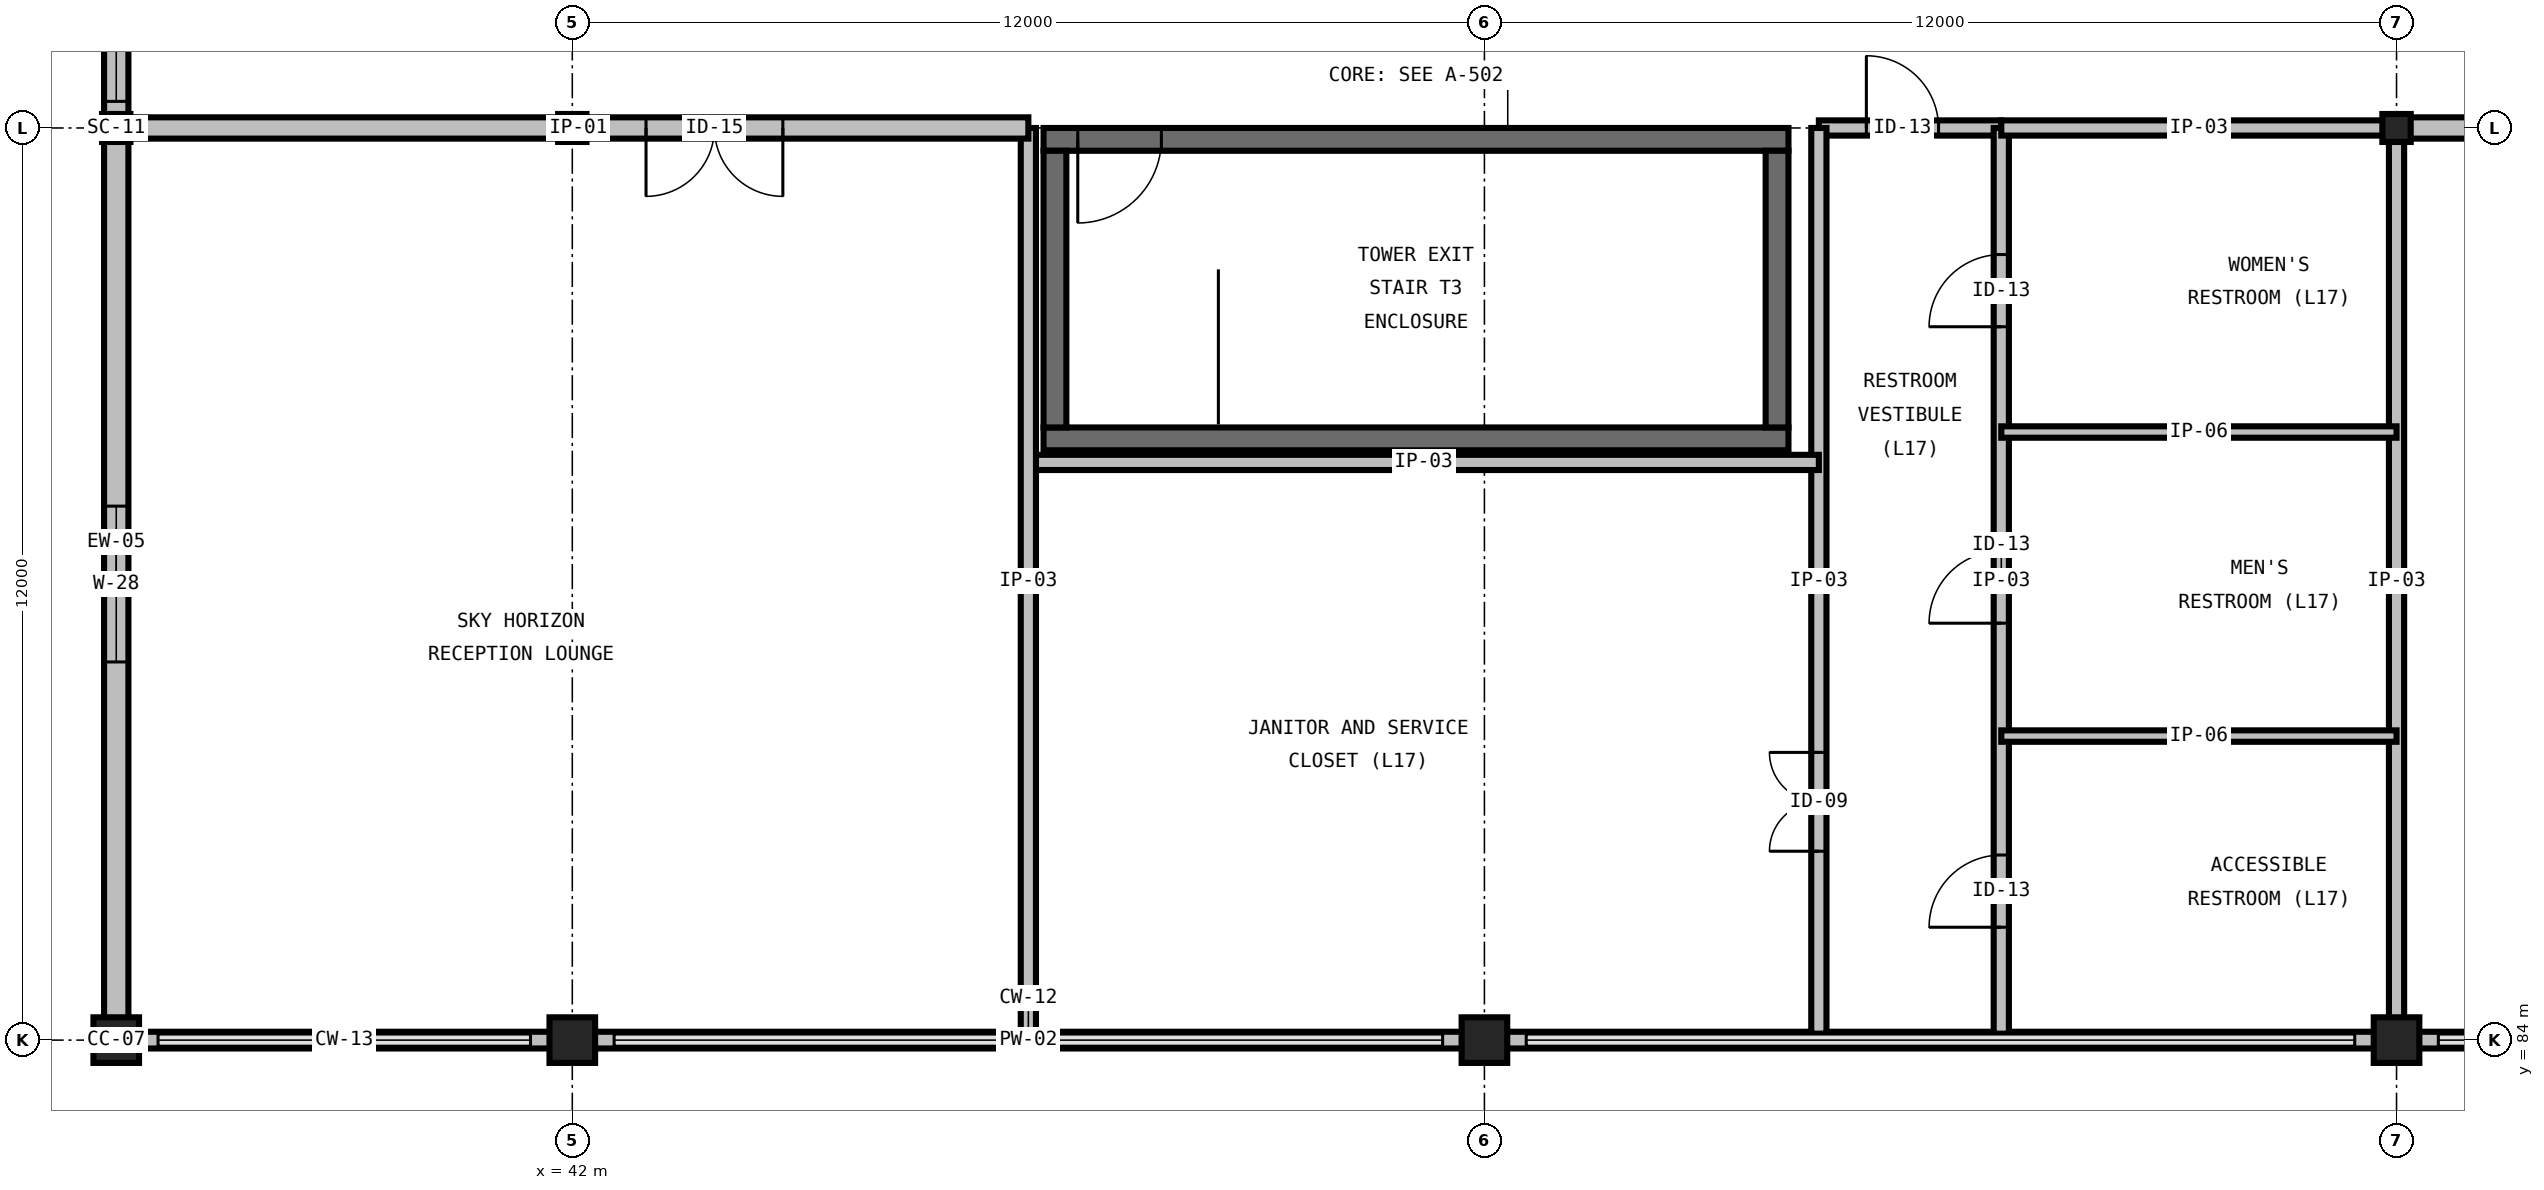
"""IFC4 building model, lengths in metres.
Left out: names, types, materials, properties, quantities, classifications, styles, units other than length and angle.
Written with IfcOpenShell. Run it as: python <this file> out.ifc"""

import sys

from ifc_helpers import new_model, si_unit, direction, frame, frame_2d, origin, origin_2d, place, context, subcontext, project, spatial, rectangle, i_section, extrude, element, fill, save


model = new_model("IFC4")
c1 = context("Model", 3, precision=1e-05, world=origin(), true_north=direction((0.0, 1.0)))
c2 = subcontext(c1, "Body", "Model", "MODEL_VIEW")
j1 = project(units=[si_unit("LENGTHUNIT", "METRE"), si_unit("PLANEANGLEUNIT", "RADIAN")], contexts=[c1])
p1 = place(None, origin())
s1 = spatial("IfcSite", under=j1, at=p1, CompositionType="ELEMENT")
p2 = place(p1, origin())
s2 = spatial("IfcBuilding", under=s1, at=p2, CompositionType="ELEMENT")
p3 = place(p2, frame((0.0, 0.0, 70.8)))
s3 = spatial("IfcBuildingStorey", under=s2, at=p3, CompositionType="ELEMENT", Elevation=70.8)
p4 = place(p3, frame((36.0, 84.0, 0.0), z_axis=(0.0, 0.0, 1.0), x_axis=(1.0, 0.0, 0.0)))
e1 = element("IfcColumn", 1, at=p4, inside=s3, PredefinedType="COLUMN", context=c2, shape_type="SweptSolid", body=[
    extrude(rectangle(XDim=0.6, YDim=0.6, at=origin_2d()), origin(), (0.0, 0.0, 1.0), 4.8),
])
p5 = place(p3, frame((36.0, 96.0, 0.0), z_axis=(0.0, 0.0, 1.0), x_axis=(1.0, 0.0, 0.0)))
e2 = element("IfcColumn", 2, at=p5, inside=s3, PredefinedType="COLUMN", context=c2, shape_type="SweptSolid", body=[
    extrude(i_section(OverallWidth=0.373, OverallDepth=0.368, WebThickness=0.015, FlangeThickness=0.024, FilletRadius=0.031, at=origin_2d()), origin(), (0.0, 0.0, 1.0), 4.8),
])
p6 = place(p3, frame((42.0, 84.0, 0.0), z_axis=(0.0, 0.0, 1.0), x_axis=(1.0, 0.0, 0.0)))
e3 = element("IfcColumn", 3, at=p6, inside=s3, PredefinedType="COLUMN", context=c2, shape_type="SweptSolid", body=[
    extrude(rectangle(XDim=0.6, YDim=0.6, at=origin_2d()), origin(), (0.0, 0.0, 1.0), 4.8),
])
p7 = place(p3, frame((42.0, 96.0, 0.0), z_axis=(0.0, 0.0, 1.0), x_axis=(1.0, 0.0, 0.0)))
e4 = element("IfcColumn", 4, at=p7, inside=s3, PredefinedType="COLUMN", context=c2, shape_type="SweptSolid", body=[
    extrude(i_section(OverallWidth=0.373, OverallDepth=0.368, WebThickness=0.015, FlangeThickness=0.024, FilletRadius=0.031, at=origin_2d()), origin(), (0.0, 0.0, 1.0), 4.8),
])
for number, where, z_axis, x_axis in (
    (5, (54.0, 84.0, 0.0), (0.0, 0.0, 1.0), (1.0, 0.0, 0.0)),
    (6, (66.0, 84.0, 0.0), (0.0, 0.0, 1.0), (1.0, 0.0, 0.0)),
):
    element("IfcColumn", number, at=place(p3, frame(where, z_axis=z_axis, x_axis=x_axis)), inside=s3, PredefinedType="COLUMN", context=c2, shape_type="SweptSolid", body=[
        extrude(rectangle(XDim=0.6, YDim=0.6, at=origin_2d()), origin(), (0.0, 0.0, 1.0), 4.8),
    ])
p8 = place(p3, frame((66.0, 96.0, 0.0), z_axis=(0.0, 0.0, 1.0), x_axis=(1.0, 0.0, 0.0)))
e7 = element("IfcColumn", 7, at=p8, inside=s3, PredefinedType="COLUMN", context=c2, shape_type="SweptSolid", body=[
    extrude(i_section(OverallWidth=0.373, OverallDepth=0.368, WebThickness=0.015, FlangeThickness=0.024, FilletRadius=0.031, at=origin_2d()), origin(), (0.0, 0.0, 1.0), 4.8),
])
p9 = place(p3, frame((48.2, 91.91, 0.0), z_axis=(0.0, 0.0, 1.0), x_axis=(1.0, 0.0, 0.0)))
e8 = element("IfcWall", 8, at=p9, inside=s3, PredefinedType="SHEAR", context=c2, shape_type="SweptSolid", body=[
    extrude(rectangle(XDim=9.8, YDim=0.3, at=frame_2d((4.9, 0.0))), origin(), (0.0, 0.0, 1.0), 4.8),
])
p10 = place(p3, frame((58.0, 95.85, 0.0), z_axis=(0.0, 0.0, 1.0), x_axis=(-1.0, 0.0, 0.0)))
e9 = element("IfcWall", 9, at=p10, inside=s3, PredefinedType="SHEAR", context=c2, shape_type="SweptSolid", body=[
    extrude(rectangle(XDim=9.8, YDim=0.3, at=frame_2d((4.9, 0.0))), origin(), (0.0, 0.0, 1.0), 4.8),
])
p11 = place(p10, frame((8.25, 0.0, 0.0)))
e10 = element("IfcOpeningElement", 10, at=p11, cuts=e9, PredefinedType="OPENING", context=c2, shape_type="SweptSolid", body=[
    extrude(rectangle(XDim=1.1, YDim=2.2, at=frame_2d((0.55, 1.1))), frame((0.0, 0.165, 0.0), z_axis=(0.0, -1.0, 0.0), x_axis=(1.0, 0.0, 0.0)), (0.0, 0.0, 1.0), 0.33),
])
for number, where, z_axis, x_axis in (
    (11, (48.35, 95.7, 0.0), (0.0, 0.0, 1.0), (0.0, -1.0, 0.0)),
    (12, (57.85, 92.06, 0.0), (0.0, 0.0, 1.0), (0.0, 1.0, 0.0)),
):
    element("IfcWall", number, at=place(p3, frame(where, z_axis=z_axis, x_axis=x_axis)), inside=s3, PredefinedType="SHEAR", context=c2, shape_type="SweptSolid", body=[
        extrude(rectangle(XDim=3.64, YDim=0.3, at=frame_2d((1.82, 0.0))), origin(), (0.0, 0.0, 1.0), 4.8),
    ])
p12 = place(p3, frame((36.0, 84.0, 0.0), z_axis=(0.0, 0.0, 1.0), x_axis=(1.0, 0.0, 0.0)))
e13 = element("IfcWall", 13, at=p12, inside=s3, PredefinedType="PARAPET", context=c2, shape_type="SweptSolid", body=[
    extrude(rectangle(XDim=6.0, YDim=0.22, at=frame_2d((3.0, 0.0))), origin(), (0.0, 0.0, 1.0), 0.2),
])
for number, where, z_axis, x_axis in (
    (14, (42.0, 84.0, 0.0), (0.0, 0.0, 1.0), (1.0, 0.0, 0.0)),
    (15, (54.0, 84.0, 0.0), (0.0, 0.0, 1.0), (1.0, 0.0, 0.0)),
    (16, (66.0, 84.0, 0.0), (0.0, 0.0, 1.0), (1.0, 0.0, 0.0)),
):
    element("IfcWall", number, at=place(p3, frame(where, z_axis=z_axis, x_axis=x_axis)), inside=s3, PredefinedType="PARAPET", context=c2, shape_type="SweptSolid", body=[
        extrude(rectangle(XDim=12.0, YDim=0.22, at=frame_2d((6.0, 0.0))), origin(), (0.0, 0.0, 1.0), 0.2),
    ])
p13 = place(p3, frame((36.0, 96.0, 0.0), z_axis=(0.0, 0.0, 1.0), x_axis=(0.0, -1.0, 0.0)))
e17 = element("IfcWall", 17, at=p13, inside=s3, PredefinedType="STANDARD", context=c2, shape_type="SweptSolid", body=[
    extrude(rectangle(XDim=12.0, YDim=0.32, at=frame_2d((6.0, 0.0))), origin(), (0.0, 0.0, 1.0), 4.171),
])
p14 = place(p13, frame((4.975, 0.0, 0.85)))
e18 = element("IfcOpeningElement", 18, at=p14, cuts=e17, PredefinedType="OPENING", context=c2, shape_type="SweptSolid", body=[
    extrude(rectangle(XDim=2.05, YDim=2.1, at=frame_2d((1.025, 1.05))), frame((0.0, 0.175, 0.0), z_axis=(0.0, -1.0, 0.0), x_axis=(1.0, 0.0, 0.0)), (0.0, 0.0, 1.0), 0.35),
])
p15 = place(p3, frame((36.0, 105.0, 0.0), z_axis=(0.0, 0.0, 1.0), x_axis=(0.0, -1.0, 0.0)))
e19 = element("IfcWall", 19, at=p15, inside=s3, PredefinedType="STANDARD", context=c2, shape_type="SweptSolid", body=[
    extrude(rectangle(XDim=9.0, YDim=0.32, at=frame_2d((4.5, 0.0))), origin(), (0.0, 0.0, 1.0), 4.171),
])
p16 = place(p15, frame((6.6, 0.0, 0.85)))
e20 = element("IfcOpeningElement", 20, at=p16, cuts=e19, PredefinedType="OPENING", context=c2, shape_type="SweptSolid", body=[
    extrude(rectangle(XDim=2.05, YDim=2.1, at=frame_2d((1.025, 1.05))), frame((0.0, 0.175, 0.0), z_axis=(0.0, -1.0, 0.0), x_axis=(1.0, 0.0, 0.0)), (0.0, 0.0, 1.0), 0.35),
])
p17 = place(p3, frame((36.0, 84.14, 4.8), z_axis=(0.0, 0.0, 1.0), x_axis=(1.0, 0.0, 0.0)))
e21 = element("IfcWall", 21, at=p17, inside=s3, PredefinedType="PARAPET", context=c2, shape_type="SweptSolid", body=[
    extrude(rectangle(XDim=42.0, YDim=0.28, at=frame_2d((21.0, 0.0))), origin(), (0.0, 0.0, 1.0), 1.2),
])
p18 = place(p3, frame((36.14, 116.72, 4.8), z_axis=(0.0, 0.0, 1.0), x_axis=(0.0, -1.0, 0.0)))
e22 = element("IfcWall", 22, at=p18, inside=s3, PredefinedType="PARAPET", context=c2, shape_type="SweptSolid", body=[
    extrude(rectangle(XDim=32.44, YDim=0.28, at=frame_2d((16.22, 0.0))), origin(), (0.0, 0.0, 1.0), 1.2),
])
p19 = place(p3, frame((58.4, 96.0, 0.0), z_axis=(0.0, 0.0, 1.0), x_axis=(1.0, 0.0, 0.0)))
e23 = element("IfcWall", 23, at=p19, inside=s3, PredefinedType="PARTITIONING", context=c2, shape_type="SweptSolid", body=[
    extrude(rectangle(XDim=2.4, YDim=0.2, at=frame_2d((1.2, 0.0))), origin(), (0.0, 0.0, 1.0), 3.549),
])
p20 = place(p19, frame((0.625, 0.0, 0.0)))
e24 = element("IfcOpeningElement", 24, at=p20, cuts=e23, PredefinedType="OPENING", context=c2, shape_type="SweptSolid", body=[
    extrude(rectangle(XDim=0.95, YDim=2.15, at=frame_2d((0.475, 1.075))), frame((0.0, 0.115, 0.0), z_axis=(0.0, -1.0, 0.0), x_axis=(1.0, 0.0, 0.0)), (0.0, 0.0, 1.0), 0.23),
])
p21 = place(p3, frame((58.4, 84.085, 0.0), z_axis=(0.0, 0.0, 1.0), x_axis=(0.0, 1.0, 0.0)))
e25 = element("IfcWall", 25, at=p21, inside=s3, PredefinedType="PARTITIONING", context=c2, shape_type="SweptSolid", body=[
    extrude(rectangle(XDim=11.915, YDim=0.2, at=frame_2d((5.957, 0.0))), origin(), (0.0, 0.0, 1.0), 4.48),
])
p22 = place(p21, frame((2.4, 0.0, 0.0)))
e26 = element("IfcOpeningElement", 26, at=p22, cuts=e25, PredefinedType="OPENING", context=c2, shape_type="SweptSolid", body=[
    extrude(rectangle(XDim=1.3, YDim=2.2, at=frame_2d((0.65, 1.1))), frame((0.0, 0.115, 0.0), z_axis=(0.0, -1.0, 0.0), x_axis=(1.0, 0.0, 0.0)), (0.0, 0.0, 1.0), 0.23),
])
p23 = place(p3, frame((60.8, 84.085, 0.0), z_axis=(0.0, 0.0, 1.0), x_axis=(0.0, 1.0, 0.0)))
e27 = element("IfcWall", 27, at=p23, inside=s3, PredefinedType="PARTITIONING", context=c2, shape_type="SweptSolid", body=[
    extrude(rectangle(XDim=11.915, YDim=0.2, at=frame_2d((5.957, 0.0))), origin(), (0.0, 0.0, 1.0), 4.48),
])
p24 = place(p23, frame((1.4, 0.0, 0.0)))
e28 = element("IfcOpeningElement", 28, at=p24, cuts=e27, PredefinedType="OPENING", context=c2, shape_type="SweptSolid", body=[
    extrude(rectangle(XDim=0.95, YDim=2.15, at=frame_2d((0.475, 1.075))), frame((0.0, 0.115, 0.0), z_axis=(0.0, -1.0, 0.0), x_axis=(1.0, 0.0, 0.0)), (0.0, 0.0, 1.0), 0.23),
])
p25 = place(p23, frame((5.4, 0.0, 0.0)))
e29 = element("IfcOpeningElement", 29, at=p25, cuts=e27, PredefinedType="OPENING", context=c2, shape_type="SweptSolid", body=[
    extrude(rectangle(XDim=0.95, YDim=2.15, at=frame_2d((0.475, 1.075))), frame((0.0, 0.115, 0.0), z_axis=(0.0, -1.0, 0.0), x_axis=(1.0, 0.0, 0.0)), (0.0, 0.0, 1.0), 0.23),
])
p26 = place(p23, frame((9.3, 0.0, 0.0)))
e30 = element("IfcOpeningElement", 30, at=p26, cuts=e27, PredefinedType="OPENING", context=c2, shape_type="SweptSolid", body=[
    extrude(rectangle(XDim=0.95, YDim=2.15, at=frame_2d((0.475, 1.075))), frame((0.0, 0.115, 0.0), z_axis=(0.0, -1.0, 0.0), x_axis=(1.0, 0.0, 0.0)), (0.0, 0.0, 1.0), 0.23),
])
p27 = place(p3, frame((66.0, 84.085, 0.0), z_axis=(0.0, 0.0, 1.0), x_axis=(0.0, 1.0, 0.0)))
e31 = element("IfcWall", 31, at=p27, inside=s3, PredefinedType="PARTITIONING", context=c2, shape_type="SweptSolid", body=[
    extrude(rectangle(XDim=11.915, YDim=0.2, at=frame_2d((5.957, 0.0))), origin(), (0.0, 0.0, 1.0), 3.78),
])
p28 = place(p3, frame((60.8, 96.0, 0.0), z_axis=(0.0, 0.0, 1.0), x_axis=(1.0, 0.0, 0.0)))
e32 = element("IfcWall", 32, at=p28, inside=s3, PredefinedType="PARTITIONING", context=c2, shape_type="SweptSolid", body=[
    extrude(rectangle(XDim=5.2, YDim=0.2, at=frame_2d((2.6, 0.0))), origin(), (0.0, 0.0, 1.0), 3.549),
])
for number, where, z_axis, x_axis in (
    (33, (60.8, 88.0, 0.0), (0.0, 0.0, 1.0), (1.0, 0.0, 0.0)),
    (34, (60.8, 92.0, 0.0), (0.0, 0.0, 1.0), (1.0, 0.0, 0.0)),
):
    element("IfcWall", number, at=place(p3, frame(where, z_axis=z_axis, x_axis=x_axis)), inside=s3, PredefinedType="PARTITIONING", context=c2, shape_type="SweptSolid", body=[
        extrude(rectangle(XDim=5.2, YDim=0.15, at=frame_2d((2.6, 0.0))), origin(), (0.0, 0.0, 1.0), 4.48),
    ])
p29 = place(p3, frame((48.0, 91.6, 0.0), z_axis=(0.0, 0.0, 1.0), x_axis=(1.0, 0.0, 0.0)))
e35 = element("IfcWall", 35, at=p29, inside=s3, PredefinedType="PARTITIONING", context=c2, shape_type="SweptSolid", body=[
    extrude(rectangle(XDim=10.4, YDim=0.2, at=frame_2d((5.2, 0.0))), origin(), (0.0, 0.0, 1.0), 4.48),
])
p30 = place(p3, frame((48.0, 84.085, 0.0), z_axis=(0.0, 0.0, 1.0), x_axis=(0.0, 1.0, 0.0)))
e36 = element("IfcWall", 36, at=p30, inside=s3, PredefinedType="PARTITIONING", context=c2, shape_type="SweptSolid", body=[
    extrude(rectangle(XDim=11.915, YDim=0.2, at=frame_2d((5.957, 0.0))), origin(), (0.0, 0.0, 1.0), 4.48),
])
p31 = place(p3, frame((48.0, 96.0, 0.0), z_axis=(0.0, 0.0, 1.0), x_axis=(-1.0, 0.0, 0.0)))
e37 = element("IfcWall", 37, at=p31, inside=s3, PredefinedType="PARTITIONING", context=c2, shape_type="SweptSolid", body=[
    extrude(rectangle(XDim=11.84, YDim=0.28, at=frame_2d((5.92, 0.0))), origin(), (0.0, 0.0, 1.0), 3.549),
])
p32 = place(p31, frame((3.23, 0.0, 0.0)))
e38 = element("IfcOpeningElement", 38, at=p32, cuts=e37, PredefinedType="OPENING", context=c2, shape_type="SweptSolid", body=[
    extrude(rectangle(XDim=1.8, YDim=2.3, at=frame_2d((0.9, 1.15))), frame((0.0, 0.155, 0.0), z_axis=(0.0, -1.0, 0.0), x_axis=(1.0, 0.0, 0.0)), (0.0, 0.0, 1.0), 0.31),
])
p33 = place(p3, frame((77.84, 96.0, 0.0), z_axis=(0.0, 0.0, 1.0), x_axis=(-1.0, 0.0, 0.0)))
e39 = element("IfcWall", 39, at=p33, inside=s3, PredefinedType="PARTITIONING", context=c2, shape_type="SweptSolid", body=[
    extrude(rectangle(XDim=11.84, YDim=0.28, at=frame_2d((5.92, 0.0))), origin(), (0.0, 0.0, 1.0), 3.854),
])
p34 = place(p33, frame((4.5, 0.0, 0.0)))
e40 = element("IfcOpeningElement", 40, at=p34, cuts=e39, PredefinedType="OPENING", context=c2, shape_type="SweptSolid", body=[
    extrude(rectangle(XDim=1.8, YDim=2.3, at=frame_2d((0.9, 1.15))), frame((0.0, 0.155, 0.0), z_axis=(0.0, -1.0, 0.0), x_axis=(1.0, 0.0, 0.0)), (0.0, 0.0, 1.0), 0.31),
])
p35 = place(p11, origin())
e41 = element("IfcDoor", 41, at=p35, inside=s3, OperationType="SINGLE_SWING_RIGHT", PredefinedType="DOOR", context=c2, shape_type="SweptSolid", body=[
    extrude(rectangle(XDim=1.1, YDim=2.2, at=frame_2d((0.55, 1.1))), frame((0.0, 0.025, 0.0), z_axis=(0.0, -1.0, 0.0), x_axis=(1.0, 0.0, 0.0)), (0.0, 0.0, 1.0), 0.05),
])
fill(e10, e41)
p36 = place(p3, frame((0.0, 0.0, 4.48)))
p37 = place(p36, frame((49.5, 93.88, 0.0)))
p38 = place(p37, frame((0.0, 0.0, 0.27)))
e42 = element("IfcDoor", 42, at=p38, inside=s3, OperationType="SWING_FIXED_LEFT", PredefinedType="TRAPDOOR", context=c2, shape_type="SweptSolid", body=[
    extrude(rectangle(XDim=1.0, YDim=1.2, at=origin_2d()), origin(), (0.0, 0.0, 1.0), 0.05),
])
p39 = place(p14, origin())
e43 = element("IfcWindow", 43, at=p39, inside=s3, PartitioningType="DOUBLE_PANEL_VERTICAL", PredefinedType="WINDOW", context=c2, shape_type="SweptSolid", body=[
    extrude(rectangle(XDim=2.05, YDim=2.1, at=frame_2d((1.025, 1.05))), frame((0.0, 0.03, 0.0), z_axis=(0.0, -1.0, 0.0), x_axis=(1.0, 0.0, 0.0)), (0.0, 0.0, 1.0), 0.06),
])
fill(e18, e43)
p40 = place(p16, origin())
e44 = element("IfcWindow", 44, at=p40, inside=s3, PartitioningType="DOUBLE_PANEL_VERTICAL", PredefinedType="WINDOW", context=c2, shape_type="SweptSolid", body=[
    extrude(rectangle(XDim=2.05, YDim=2.1, at=frame_2d((1.025, 1.05))), frame((0.0, 0.03, 0.0), z_axis=(0.0, -1.0, 0.0), x_axis=(1.0, 0.0, 0.0)), (0.0, 0.0, 1.0), 0.06),
])
fill(e20, e44)
p41 = place(p20, origin())
e45 = element("IfcDoor", 45, at=p41, inside=s3, OperationType="SINGLE_SWING_LEFT", PredefinedType="DOOR", context=c2, shape_type="SweptSolid", body=[
    extrude(rectangle(XDim=0.95, YDim=2.15, at=frame_2d((0.475, 1.075))), frame((0.0, 0.025, 0.0), z_axis=(0.0, -1.0, 0.0), x_axis=(1.0, 0.0, 0.0)), (0.0, 0.0, 1.0), 0.05),
])
fill(e24, e45)
p42 = place(p22, origin())
e46 = element("IfcDoor", 46, at=p42, inside=s3, OperationType="DOUBLE_DOOR_SINGLE_SWING", PredefinedType="DOOR", context=c2, shape_type="SweptSolid", body=[
    extrude(rectangle(XDim=1.3, YDim=2.2, at=frame_2d((0.65, 1.1))), frame((0.0, 0.025, 0.0), z_axis=(0.0, -1.0, 0.0), x_axis=(1.0, 0.0, 0.0)), (0.0, 0.0, 1.0), 0.05),
])
fill(e26, e46)
p43 = place(p24, origin())
e47 = element("IfcDoor", 47, at=p43, inside=s3, OperationType="SINGLE_SWING_LEFT", PredefinedType="DOOR", context=c2, shape_type="SweptSolid", body=[
    extrude(rectangle(XDim=0.95, YDim=2.15, at=frame_2d((0.475, 1.075))), frame((0.0, 0.025, 0.0), z_axis=(0.0, -1.0, 0.0), x_axis=(1.0, 0.0, 0.0)), (0.0, 0.0, 1.0), 0.05),
])
fill(e28, e47)
p44 = place(p25, origin())
e48 = element("IfcDoor", 48, at=p44, inside=s3, OperationType="SINGLE_SWING_LEFT", PredefinedType="DOOR", context=c2, shape_type="SweptSolid", body=[
    extrude(rectangle(XDim=0.95, YDim=2.15, at=frame_2d((0.475, 1.075))), frame((0.0, 0.025, 0.0), z_axis=(0.0, -1.0, 0.0), x_axis=(1.0, 0.0, 0.0)), (0.0, 0.0, 1.0), 0.05),
])
fill(e29, e48)
p45 = place(p26, origin())
e49 = element("IfcDoor", 49, at=p45, inside=s3, OperationType="SINGLE_SWING_LEFT", PredefinedType="DOOR", context=c2, shape_type="SweptSolid", body=[
    extrude(rectangle(XDim=0.95, YDim=2.15, at=frame_2d((0.475, 1.075))), frame((0.0, 0.025, 0.0), z_axis=(0.0, -1.0, 0.0), x_axis=(1.0, 0.0, 0.0)), (0.0, 0.0, 1.0), 0.05),
])
fill(e30, e49)
p46 = place(p32, origin())
e50 = element("IfcDoor", 50, at=p46, inside=s3, OperationType="DOUBLE_DOOR_SINGLE_SWING", PredefinedType="DOOR", context=c2, shape_type="SweptSolid", body=[
    extrude(rectangle(XDim=1.8, YDim=2.3, at=frame_2d((0.9, 1.15))), frame((0.0, 0.025, 0.0), z_axis=(0.0, -1.0, 0.0), x_axis=(1.0, 0.0, 0.0)), (0.0, 0.0, 1.0), 0.05),
])
fill(e38, e50)
save(model, sys.argv[1])
